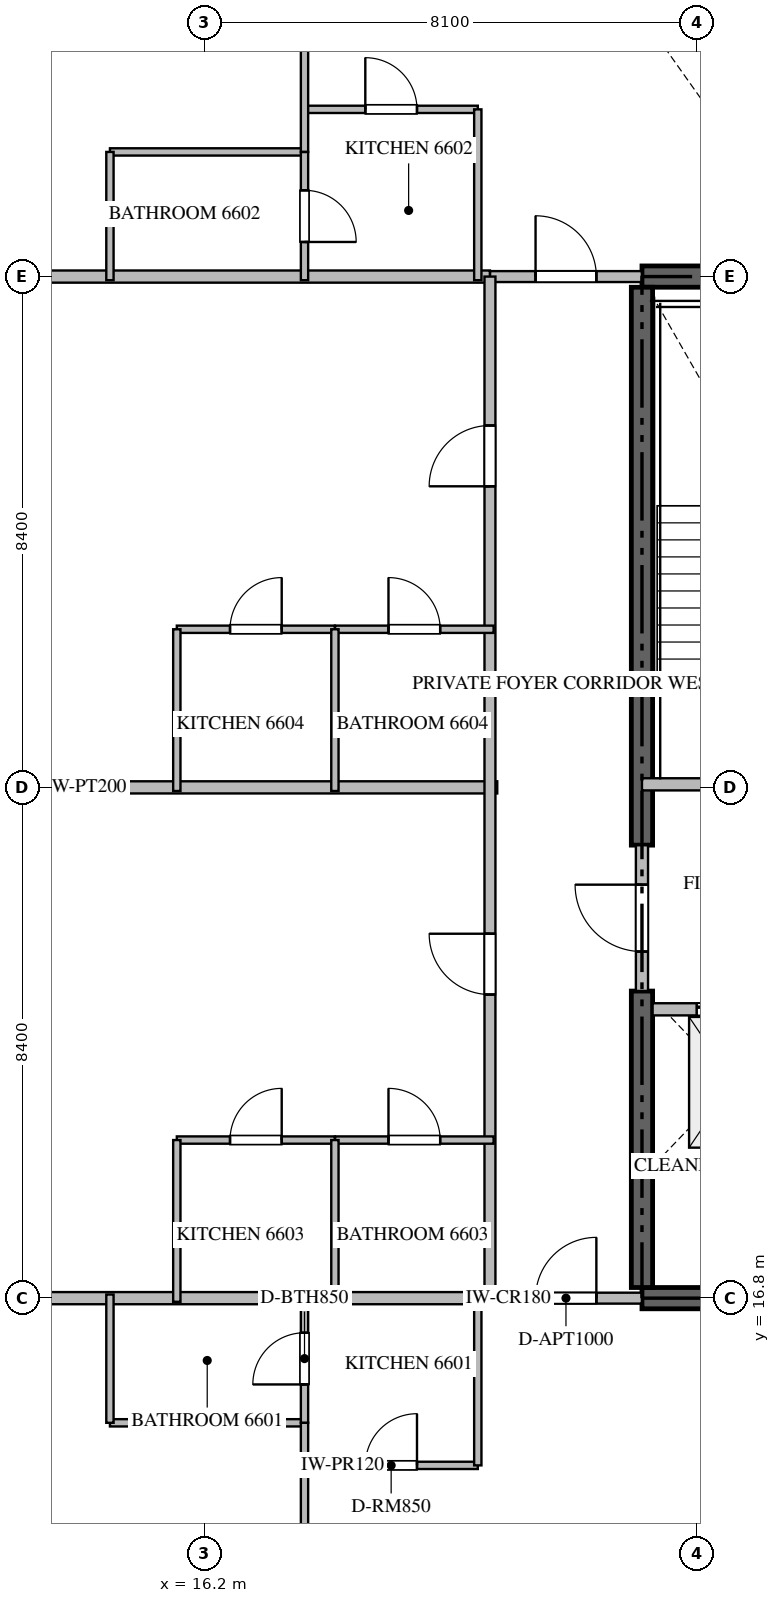
"""IFC4 building model, lengths in metres.
Left out: names, types, materials, properties, quantities, classifications, styles, units other than length and angle.
Written with IfcOpenShell. Run it as: python <this file> out.ifc"""

import sys

from ifc_helpers import new_model, si_unit, direction, frame, frame_2d, origin, place, context, subcontext, project, spatial, rectangle, extrude, source, transform, mapped, element, fill, save


model = new_model("IFC4")
c1 = context("Model", 3, precision=1e-05, world=origin(), true_north=direction((0.0, 1.0)))
c2 = subcontext(c1, "Body", "Model", "MODEL_VIEW")
j1 = project(units=[si_unit("LENGTHUNIT", "METRE"), si_unit("PLANEANGLEUNIT", "RADIAN")], contexts=[c1])
p1 = place(None, origin())
s1 = spatial("IfcSite", under=j1, at=p1, CompositionType="ELEMENT")
p2 = place(p1, origin())
s2 = spatial("IfcBuilding", under=s1, at=p2, CompositionType="ELEMENT")
p3 = place(p2, frame((0.0, 0.0, 264.35)))
s3 = spatial("IfcBuildingStorey", under=s2, at=p3, CompositionType="ELEMENT", Elevation=264.35)
for number, where, z_axis, x_axis in (
    (1, (23.4, 16.8, -0.26), (0.0, 0.0, 1.0), (1.0, 0.0, 0.0)),
    (2, (41.4, 33.6, -0.26), (0.0, 0.0, 1.0), (-1.0, 0.0, 0.0)),
):
    element("IfcWall", number, at=place(p3, frame(where, z_axis=z_axis, x_axis=x_axis)), inside=s3, PredefinedType="SHEAR", context=c2, shape_type="SweptSolid", body=[
        extrude(rectangle(XDim=18.0, YDim=0.35, at=frame_2d((9.0, 0.0))), origin(), (0.0, 0.0, 1.0), 3.848),
    ])
p4 = place(p3, frame((23.4, 16.975, -0.26), z_axis=(0.0, 0.0, 1.0), x_axis=(0.0, 1.0, 0.0)))
e3 = element("IfcWall", 3, at=p4, inside=s3, PredefinedType="SHEAR", context=c2, shape_type="SweptSolid", body=[
    extrude(rectangle(XDim=4.875, YDim=0.35, at=frame_2d((2.438, 0.0))), origin(), (0.0, 0.0, 1.0), 3.848),
])
p5 = place(p3, frame((23.4, 24.25, -0.26), z_axis=(0.0, 0.0, 1.0), x_axis=(0.0, 1.0, 0.0)))
e4 = element("IfcWall", 4, at=p5, inside=s3, PredefinedType="SHEAR", context=c2, shape_type="SweptSolid", body=[
    extrude(rectangle(XDim=9.175, YDim=0.35, at=frame_2d((4.587, 0.0))), origin(), (0.0, 0.0, 1.0), 3.848),
])
p6 = place(p3, frame((23.4, 25.25, 0.0), z_axis=(0.0, 0.0, 1.0), x_axis=(1.0, 0.0, 0.0)))
e5 = element("IfcWall", 5, at=p6, inside=s3, PredefinedType="STANDARD", context=c2, shape_type="SweptSolid", body=[
    extrude(rectangle(XDim=4.45, YDim=0.2, at=frame_2d((2.225, 0.0))), origin(), (0.0, 0.0, 1.0), 3.59),
])
p7 = place(p6, frame((1.65, 0.0, 0.0)))
e6 = element("IfcOpeningElement", 6, at=p7, cuts=e5, PredefinedType="OPENING", context=c2, shape_type="SweptSolid", body=[
    extrude(rectangle(XDim=1.1, YDim=2.15, at=frame_2d((0.55, 1.075))), frame((0.0, 0.11, 0.0), z_axis=(0.0, -1.0, 0.0), x_axis=(1.0, 0.0, 0.0)), (0.0, 0.0, 1.0), 0.22),
])
p8 = place(p3, frame((23.575, 21.55, 0.0), z_axis=(0.0, 0.0, 1.0), x_axis=(1.0, 0.0, 0.0)))
e7 = element("IfcWall", 7, at=p8, inside=s3, PredefinedType="STANDARD", context=c2, shape_type="SweptSolid", body=[
    extrude(rectangle(XDim=2.475, YDim=0.2, at=frame_2d((1.238, 0.0))), origin(), (0.0, 0.0, 1.0), 3.59),
])
p9 = place(p8, frame((0.725, 0.0, 0.0)))
e8 = element("IfcOpeningElement", 8, at=p9, cuts=e7, PredefinedType="OPENING", context=c2, shape_type="SweptSolid", body=[
    extrude(rectangle(XDim=1.2, YDim=2.2, at=frame_2d((0.6, 1.1))), frame((0.0, 0.11, 0.0), z_axis=(0.0, -1.0, 0.0), x_axis=(1.0, 0.0, 0.0)), (0.0, 0.0, 1.0), 0.22),
])
p10 = place(p3, frame((23.575, 19.05, 0.0), z_axis=(0.0, 0.0, 1.0), x_axis=(1.0, 0.0, 0.0)))
e9 = element("IfcWall", 9, at=p10, inside=s3, PredefinedType="STANDARD", context=c2, shape_type="SweptSolid", body=[
    extrude(rectangle(XDim=2.475, YDim=0.2, at=frame_2d((1.238, 0.0))), origin(), (0.0, 0.0, 1.0), 3.59),
])
p11 = place(p3, frame((23.4, 21.852, 0.0), z_axis=(0.0, 0.0, 1.0), x_axis=(0.0, 1.0, 0.0)))
e10 = element("IfcWall", 10, at=p11, inside=s3, PredefinedType="STANDARD", context=c2, shape_type="SweptSolid", body=[
    extrude(rectangle(XDim=2.396, YDim=0.2, at=frame_2d((1.198, 0.0))), origin(), (0.0, 0.0, 1.0), 3.59),
])
p12 = place(p11, frame((0.648, 0.0, 0.0)))
e11 = element("IfcOpeningElement", 11, at=p12, cuts=e10, PredefinedType="OPENING", context=c2, shape_type="SweptSolid", body=[
    extrude(rectangle(XDim=1.1, YDim=2.15, at=frame_2d((0.55, 1.075))), frame((0.0, 0.11, 0.0), z_axis=(0.0, -1.0, 0.0), x_axis=(1.0, 0.0, 0.0)), (0.0, 0.0, 1.0), 0.22),
])
p13 = place(p3, frame((7.482, 25.2, 0.0), z_axis=(0.0, 0.0, 1.0), x_axis=(1.0, 0.0, 0.0)))
e12 = element("IfcWall", 12, at=p13, inside=s3, PredefinedType="PARTITIONING", context=c2, shape_type="SweptSolid", body=[
    extrude(rectangle(XDim=13.538, YDim=0.2, at=frame_2d((6.769, 0.0))), origin(), (0.0, 0.0, 1.0), 3.59),
])
for number, where, z_axis, x_axis in (
    (13, (7.482, 16.8, 0.0), (0.0, 0.0, 1.0), (1.0, 0.0, 0.0)),
    (14, (7.482, 33.6, 0.0), (0.0, 0.0, 1.0), (1.0, 0.0, 0.0)),
):
    element("IfcWall", number, at=place(p3, frame(where, z_axis=z_axis, x_axis=x_axis)), inside=s3, PredefinedType="PARTITIONING", context=c2, shape_type="SweptSolid", body=[
        extrude(rectangle(XDim=13.418, YDim=0.2, at=frame_2d((6.709, 0.0))), origin(), (0.0, 0.0, 1.0), 3.59),
    ])
p14 = place(p3, frame((20.902, 16.8, 0.0), z_axis=(0.0, 0.0, 1.0), x_axis=(1.0, 0.0, 0.0)))
e15 = element("IfcWall", 15, at=p14, inside=s3, PredefinedType="PARTITIONING", context=c2, shape_type="SweptSolid", body=[
    extrude(rectangle(XDim=2.496, YDim=0.18, at=frame_2d((1.248, 0.0))), origin(), (0.0, 0.0, 1.0), 3.59),
])
p15 = place(p14, frame((0.748, 0.0, 0.0)))
e16 = element("IfcOpeningElement", 16, at=p15, cuts=e15, PredefinedType="OPENING", context=c2, shape_type="SweptSolid", body=[
    extrude(rectangle(XDim=1.0, YDim=2.15, at=frame_2d((0.5, 1.075))), frame((0.0, 0.1, 0.0), z_axis=(0.0, -1.0, 0.0), x_axis=(1.0, 0.0, 0.0)), (0.0, 0.0, 1.0), 0.2),
])
p16 = place(p3, frame((20.902, 33.6, 0.0), z_axis=(0.0, 0.0, 1.0), x_axis=(1.0, 0.0, 0.0)))
e17 = element("IfcWall", 17, at=p16, inside=s3, PredefinedType="PARTITIONING", context=c2, shape_type="SweptSolid", body=[
    extrude(rectangle(XDim=2.496, YDim=0.18, at=frame_2d((1.248, 0.0))), origin(), (0.0, 0.0, 1.0), 3.59),
])
p17 = place(p16, frame((0.748, 0.0, 0.0)))
e18 = element("IfcOpeningElement", 18, at=p17, cuts=e17, PredefinedType="OPENING", context=c2, shape_type="SweptSolid", body=[
    extrude(rectangle(XDim=1.0, YDim=2.15, at=frame_2d((0.5, 1.075))), frame((0.0, 0.1, 0.0), z_axis=(0.0, -1.0, 0.0), x_axis=(1.0, 0.0, 0.0)), (0.0, 0.0, 1.0), 0.2),
])
p18 = place(p3, frame((20.9, 16.8, 0.0), z_axis=(0.0, 0.0, 1.0), x_axis=(0.0, 1.0, 0.0)))
e19 = element("IfcWall", 19, at=p18, inside=s3, PredefinedType="PARTITIONING", context=c2, shape_type="SweptSolid", body=[
    extrude(rectangle(XDim=16.8, YDim=0.18, at=frame_2d((8.4, 0.0))), origin(), (0.0, 0.0, 1.0), 3.59),
])
p19 = place(p18, frame((4.993, 0.0, 0.0)))
e20 = element("IfcOpeningElement", 20, at=p19, cuts=e19, PredefinedType="OPENING", context=c2, shape_type="SweptSolid", body=[
    extrude(rectangle(XDim=1.0, YDim=2.15, at=frame_2d((0.5, 1.075))), frame((0.0, 0.1, 0.0), z_axis=(0.0, -1.0, 0.0), x_axis=(1.0, 0.0, 0.0)), (0.0, 0.0, 1.0), 0.2),
])
p20 = place(p18, frame((13.351, 0.0, 0.0)))
e21 = element("IfcOpeningElement", 21, at=p20, cuts=e19, PredefinedType="OPENING", context=c2, shape_type="SweptSolid", body=[
    extrude(rectangle(XDim=1.0, YDim=2.15, at=frame_2d((0.5, 1.075))), frame((0.0, 0.1, 0.0), z_axis=(0.0, -1.0, 0.0), x_axis=(1.0, 0.0, 0.0)), (0.0, 0.0, 1.0), 0.2),
])
p21 = place(p3, frame((17.85, 14.05, 0.0), z_axis=(0.0, 0.0, 1.0), x_axis=(1.0, 0.0, 0.0)))
e22 = element("IfcWall", 22, at=p21, inside=s3, PredefinedType="PARTITIONING", context=c2, shape_type="SweptSolid", body=[
    extrude(rectangle(XDim=2.85, YDim=0.12, at=frame_2d((1.425, 0.0))), origin(), (0.0, 0.0, 1.0), 3.59),
])
p22 = place(p21, frame((1.0, 0.0, 0.0)))
e23 = element("IfcOpeningElement", 23, at=p22, cuts=e22, PredefinedType="OPENING", context=c2, shape_type="SweptSolid", body=[
    extrude(rectangle(XDim=0.85, YDim=2.1, at=frame_2d((0.425, 1.05))), frame((0.0, 0.07, 0.0), z_axis=(0.0, -1.0, 0.0), x_axis=(1.0, 0.0, 0.0)), (0.0, 0.0, 1.0), 0.14),
])
p23 = place(p3, frame((20.7, 14.05, 0.0), z_axis=(0.0, 0.0, 1.0), x_axis=(0.0, 1.0, 0.0)))
e24 = element("IfcWall", 24, at=p23, inside=s3, PredefinedType="PARTITIONING", context=c2, shape_type="SweptSolid", body=[
    extrude(rectangle(XDim=2.81, YDim=0.12, at=frame_2d((1.405, 0.0))), origin(), (0.0, 0.0, 1.0), 3.59),
])
p24 = place(p3, frame((14.65, 14.75, 0.0), z_axis=(0.0, 0.0, 1.0), x_axis=(1.0, 0.0, 0.0)))
e25 = element("IfcWall", 25, at=p24, inside=s3, PredefinedType="PARTITIONING", context=c2, shape_type="SweptSolid", body=[
    extrude(rectangle(XDim=3.2, YDim=0.12, at=frame_2d((1.6, 0.0))), origin(), (0.0, 0.0, 1.0), 3.59),
])
p25 = place(p3, frame((14.65, 14.75, 0.0), z_axis=(0.0, 0.0, 1.0), x_axis=(0.0, 1.0, 0.0)))
e26 = element("IfcWall", 26, at=p25, inside=s3, PredefinedType="PARTITIONING", context=c2, shape_type="SweptSolid", body=[
    extrude(rectangle(XDim=2.11, YDim=0.12, at=frame_2d((1.055, 0.0))), origin(), (0.0, 0.0, 1.0), 3.59),
])
p26 = place(p3, frame((17.85, 10.096, 0.0), z_axis=(0.0, 0.0, 1.0), x_axis=(0.0, 1.0, 0.0)))
e27 = element("IfcWall", 27, at=p26, inside=s3, PredefinedType="PARTITIONING", context=c2, shape_type="SweptSolid", body=[
    extrude(rectangle(XDim=4.654, YDim=0.12, at=frame_2d((2.327, 0.0))), origin(), (0.0, 0.0, 1.0), 3.59),
])
p27 = place(p26, frame((1.902, 0.0, 0.0)))
e28 = element("IfcOpeningElement", 28, at=p27, cuts=e27, PredefinedType="OPENING", context=c2, shape_type="SweptSolid", body=[
    extrude(rectangle(XDim=0.85, YDim=2.1, at=frame_2d((0.425, 1.05))), frame((0.0, 0.07, 0.0), z_axis=(0.0, -1.0, 0.0), x_axis=(1.0, 0.0, 0.0)), (0.0, 0.0, 1.0), 0.14),
])
p28 = place(p3, frame((17.85, 14.752, 0.0), z_axis=(0.0, 0.0, 1.0), x_axis=(0.0, 1.0, 0.0)))
e29 = element("IfcWall", 29, at=p28, inside=s3, PredefinedType="PARTITIONING", context=c2, shape_type="SweptSolid", body=[
    extrude(rectangle(XDim=2.108, YDim=0.12, at=frame_2d((1.054, 0.0))), origin(), (0.0, 0.0, 1.0), 3.59),
])
p29 = place(p28, frame((0.629, 0.0, 0.0)))
e30 = element("IfcOpeningElement", 30, at=p29, cuts=e29, PredefinedType="OPENING", context=c2, shape_type="SweptSolid", body=[
    extrude(rectangle(XDim=0.85, YDim=2.1, at=frame_2d((0.425, 1.05))), frame((0.0, 0.07, 0.0), z_axis=(0.0, -1.0, 0.0), x_axis=(1.0, 0.0, 0.0)), (0.0, 0.0, 1.0), 0.14),
])
p30 = place(p3, frame((17.85, 36.35, 0.0), z_axis=(0.0, 0.0, 1.0), x_axis=(1.0, 0.0, 0.0)))
e31 = element("IfcWall", 31, at=p30, inside=s3, PredefinedType="PARTITIONING", context=c2, shape_type="SweptSolid", body=[
    extrude(rectangle(XDim=2.85, YDim=0.12, at=frame_2d((1.425, 0.0))), origin(), (0.0, 0.0, 1.0), 3.59),
])
p31 = place(p30, frame((1.0, 0.0, 0.0)))
e32 = element("IfcOpeningElement", 32, at=p31, cuts=e31, PredefinedType="OPENING", context=c2, shape_type="SweptSolid", body=[
    extrude(rectangle(XDim=0.85, YDim=2.1, at=frame_2d((0.425, 1.05))), frame((0.0, 0.07, 0.0), z_axis=(0.0, -1.0, 0.0), x_axis=(1.0, 0.0, 0.0)), (0.0, 0.0, 1.0), 0.14),
])
p32 = place(p3, frame((20.7, 36.35, 0.0), z_axis=(0.0, 0.0, 1.0), x_axis=(0.0, -1.0, 0.0)))
e33 = element("IfcWall", 33, at=p32, inside=s3, PredefinedType="PARTITIONING", context=c2, shape_type="SweptSolid", body=[
    extrude(rectangle(XDim=2.81, YDim=0.12, at=frame_2d((1.405, 0.0))), origin(), (0.0, 0.0, 1.0), 3.59),
])
p33 = place(p3, frame((14.65, 35.65, 0.0), z_axis=(0.0, 0.0, 1.0), x_axis=(1.0, 0.0, 0.0)))
e34 = element("IfcWall", 34, at=p33, inside=s3, PredefinedType="PARTITIONING", context=c2, shape_type="SweptSolid", body=[
    extrude(rectangle(XDim=3.2, YDim=0.12, at=frame_2d((1.6, 0.0))), origin(), (0.0, 0.0, 1.0), 3.59),
])
p34 = place(p3, frame((14.65, 35.65, 0.0), z_axis=(0.0, 0.0, 1.0), x_axis=(0.0, -1.0, 0.0)))
e35 = element("IfcWall", 35, at=p34, inside=s3, PredefinedType="PARTITIONING", context=c2, shape_type="SweptSolid", body=[
    extrude(rectangle(XDim=2.11, YDim=0.12, at=frame_2d((1.055, 0.0))), origin(), (0.0, 0.0, 1.0), 3.59),
])
p35 = place(p3, frame((17.85, 40.304, 0.0), z_axis=(0.0, 0.0, 1.0), x_axis=(0.0, -1.0, 0.0)))
e36 = element("IfcWall", 36, at=p35, inside=s3, PredefinedType="PARTITIONING", context=c2, shape_type="SweptSolid", body=[
    extrude(rectangle(XDim=4.654, YDim=0.12, at=frame_2d((2.327, 0.0))), origin(), (0.0, 0.0, 1.0), 3.59),
])
p36 = place(p35, frame((1.902, 0.0, 0.0)))
e37 = element("IfcOpeningElement", 37, at=p36, cuts=e36, PredefinedType="OPENING", context=c2, shape_type="SweptSolid", body=[
    extrude(rectangle(XDim=0.85, YDim=2.1, at=frame_2d((0.425, 1.05))), frame((0.0, 0.07, 0.0), z_axis=(0.0, -1.0, 0.0), x_axis=(1.0, 0.0, 0.0)), (0.0, 0.0, 1.0), 0.14),
])
p37 = place(p3, frame((17.85, 35.648, 0.0), z_axis=(0.0, 0.0, 1.0), x_axis=(0.0, -1.0, 0.0)))
e38 = element("IfcWall", 38, at=p37, inside=s3, PredefinedType="PARTITIONING", context=c2, shape_type="SweptSolid", body=[
    extrude(rectangle(XDim=2.108, YDim=0.12, at=frame_2d((1.054, 0.0))), origin(), (0.0, 0.0, 1.0), 3.59),
])
p38 = place(p37, frame((0.629, 0.0, 0.0)))
e39 = element("IfcOpeningElement", 39, at=p38, cuts=e38, PredefinedType="OPENING", context=c2, shape_type="SweptSolid", body=[
    extrude(rectangle(XDim=0.85, YDim=2.1, at=frame_2d((0.425, 1.05))), frame((0.0, 0.07, 0.0), z_axis=(0.0, -1.0, 0.0), x_axis=(1.0, 0.0, 0.0)), (0.0, 0.0, 1.0), 0.14),
])
p39 = place(p3, frame((15.75, 19.4, 0.0), z_axis=(0.0, 0.0, 1.0), x_axis=(1.0, 0.0, 0.0)))
e40 = element("IfcWall", 40, at=p39, inside=s3, PredefinedType="PARTITIONING", context=c2, shape_type="SweptSolid", body=[
    extrude(rectangle(XDim=2.6, YDim=0.12, at=frame_2d((1.3, 0.0))), origin(), (0.0, 0.0, 1.0), 3.59),
])
p40 = place(p39, frame((0.875, 0.0, 0.0)))
e41 = element("IfcOpeningElement", 41, at=p40, cuts=e40, PredefinedType="OPENING", context=c2, shape_type="SweptSolid", body=[
    extrude(rectangle(XDim=0.85, YDim=2.1, at=frame_2d((0.425, 1.05))), frame((0.0, 0.07, 0.0), z_axis=(0.0, -1.0, 0.0), x_axis=(1.0, 0.0, 0.0)), (0.0, 0.0, 1.0), 0.14),
])
p41 = place(p3, frame((18.352, 19.4, 0.0), z_axis=(0.0, 0.0, 1.0), x_axis=(1.0, 0.0, 0.0)))
e42 = element("IfcWall", 42, at=p41, inside=s3, PredefinedType="PARTITIONING", context=c2, shape_type="SweptSolid", body=[
    extrude(rectangle(XDim=2.608, YDim=0.12, at=frame_2d((1.304, 0.0))), origin(), (0.0, 0.0, 1.0), 3.59),
])
p42 = place(p41, frame((0.879, 0.0, 0.0)))
e43 = element("IfcOpeningElement", 43, at=p42, cuts=e42, PredefinedType="OPENING", context=c2, shape_type="SweptSolid", body=[
    extrude(rectangle(XDim=0.85, YDim=2.1, at=frame_2d((0.425, 1.05))), frame((0.0, 0.07, 0.0), z_axis=(0.0, -1.0, 0.0), x_axis=(1.0, 0.0, 0.0)), (0.0, 0.0, 1.0), 0.14),
])
for number, where, z_axis, x_axis in (
    (44, (18.35, 16.74, 0.0), (0.0, 0.0, 1.0), (0.0, 1.0, 0.0)),
    (45, (15.75, 16.74, 0.0), (0.0, 0.0, 1.0), (0.0, 1.0, 0.0)),
):
    element("IfcWall", number, at=place(p3, frame(where, z_axis=z_axis, x_axis=x_axis)), inside=s3, PredefinedType="PARTITIONING", context=c2, shape_type="SweptSolid", body=[
        extrude(rectangle(XDim=2.66, YDim=0.12, at=frame_2d((1.33, 0.0))), origin(), (0.0, 0.0, 1.0), 3.59),
    ])
p43 = place(p3, frame((15.75, 27.8, 0.0), z_axis=(0.0, 0.0, 1.0), x_axis=(1.0, 0.0, 0.0)))
e46 = element("IfcWall", 46, at=p43, inside=s3, PredefinedType="PARTITIONING", context=c2, shape_type="SweptSolid", body=[
    extrude(rectangle(XDim=2.6, YDim=0.12, at=frame_2d((1.3, 0.0))), origin(), (0.0, 0.0, 1.0), 3.59),
])
p44 = place(p43, frame((0.875, 0.0, 0.0)))
e47 = element("IfcOpeningElement", 47, at=p44, cuts=e46, PredefinedType="OPENING", context=c2, shape_type="SweptSolid", body=[
    extrude(rectangle(XDim=0.85, YDim=2.1, at=frame_2d((0.425, 1.05))), frame((0.0, 0.07, 0.0), z_axis=(0.0, -1.0, 0.0), x_axis=(1.0, 0.0, 0.0)), (0.0, 0.0, 1.0), 0.14),
])
p45 = place(p3, frame((18.352, 27.8, 0.0), z_axis=(0.0, 0.0, 1.0), x_axis=(1.0, 0.0, 0.0)))
e48 = element("IfcWall", 48, at=p45, inside=s3, PredefinedType="PARTITIONING", context=c2, shape_type="SweptSolid", body=[
    extrude(rectangle(XDim=2.608, YDim=0.12, at=frame_2d((1.304, 0.0))), origin(), (0.0, 0.0, 1.0), 3.59),
])
p46 = place(p45, frame((0.879, 0.0, 0.0)))
e49 = element("IfcOpeningElement", 49, at=p46, cuts=e48, PredefinedType="OPENING", context=c2, shape_type="SweptSolid", body=[
    extrude(rectangle(XDim=0.85, YDim=2.1, at=frame_2d((0.425, 1.05))), frame((0.0, 0.07, 0.0), z_axis=(0.0, -1.0, 0.0), x_axis=(1.0, 0.0, 0.0)), (0.0, 0.0, 1.0), 0.14),
])
for number, where, z_axis, x_axis in (
    (50, (18.35, 25.14, 0.0), (0.0, 0.0, 1.0), (0.0, 1.0, 0.0)),
    (51, (15.75, 25.14, 0.0), (0.0, 0.0, 1.0), (0.0, 1.0, 0.0)),
):
    element("IfcWall", number, at=place(p3, frame(where, z_axis=z_axis, x_axis=x_axis)), inside=s3, PredefinedType="PARTITIONING", context=c2, shape_type="SweptSolid", body=[
        extrude(rectangle(XDim=2.66, YDim=0.12, at=frame_2d((1.33, 0.0))), origin(), (0.0, 0.0, 1.0), 3.59),
    ])
m1 = source(origin(), c2, "Body", "SweptSolid", [
    extrude(rectangle(XDim=1.2, YDim=2.2, at=frame_2d((0.6, 1.1))), frame((0.0, 0.025, 0.0), z_axis=(0.0, -1.0, 0.0), x_axis=(1.0, 0.0, 0.0)), (0.0, 0.0, 1.0), 0.05),
])
p47 = place(p9, origin())
e52 = element("IfcDoor", 52, at=p47, inside=s3, OperationType="DOUBLE_DOOR_SLIDING", PredefinedType="DOOR", context=c2, shape_type="MappedRepresentation", body=[
    mapped(m1, transform((0.0, 0.0, 0.0), scale=1.0)),
])
fill(e8, e52)
m2 = source(origin(), c2, "Body", "SweptSolid", [
    extrude(rectangle(XDim=1.1, YDim=2.15, at=frame_2d((0.55, 1.075))), frame((0.0, 0.025, 0.0), z_axis=(0.0, -1.0, 0.0), x_axis=(1.0, 0.0, 0.0)), (0.0, 0.0, 1.0), 0.05),
])
p48 = place(p12, origin())
e53 = element("IfcDoor", 53, at=p48, inside=s3, OperationType="SINGLE_SWING_RIGHT", PredefinedType="DOOR", context=c2, shape_type="MappedRepresentation", body=[
    mapped(m2, transform((0.0, 0.0, 0.0), scale=1.0)),
])
fill(e11, e53)
m3 = source(origin(), c2, "Body", "SweptSolid", [
    extrude(rectangle(XDim=1.0, YDim=2.15, at=frame_2d((0.5, 1.075))), frame((0.0, 0.025, 0.0), z_axis=(0.0, -1.0, 0.0), x_axis=(1.0, 0.0, 0.0)), (0.0, 0.0, 1.0), 0.05),
])
p49 = place(p15, origin())
e54 = element("IfcDoor", 54, at=p49, inside=s3, OperationType="SINGLE_SWING_RIGHT", PredefinedType="DOOR", context=c2, shape_type="MappedRepresentation", body=[
    mapped(m3, transform((0.0, 0.0, 0.0), scale=1.0)),
])
fill(e16, e54)
p50 = place(p17, origin())
e55 = element("IfcDoor", 55, at=p50, inside=s3, OperationType="SINGLE_SWING_LEFT", PredefinedType="DOOR", context=c2, shape_type="MappedRepresentation", body=[
    mapped(m3, transform((0.0, 0.0, 0.0), scale=1.0)),
])
fill(e18, e55)
p51 = place(p19, origin())
e56 = element("IfcDoor", 56, at=p51, inside=s3, OperationType="SINGLE_SWING_RIGHT", PredefinedType="DOOR", context=c2, shape_type="MappedRepresentation", body=[
    mapped(m3, transform((0.0, 0.0, 0.0), scale=1.0)),
])
fill(e20, e56)
p52 = place(p20, origin())
e57 = element("IfcDoor", 57, at=p52, inside=s3, OperationType="SINGLE_SWING_LEFT", PredefinedType="DOOR", context=c2, shape_type="MappedRepresentation", body=[
    mapped(m3, transform((0.0, 0.0, 0.0), scale=1.0)),
])
fill(e21, e57)
m4 = source(origin(), c2, "Body", "SweptSolid", [
    extrude(rectangle(XDim=0.85, YDim=2.1, at=frame_2d((0.425, 1.05))), frame((0.0, 0.025, 0.0), z_axis=(0.0, -1.0, 0.0), x_axis=(1.0, 0.0, 0.0)), (0.0, 0.0, 1.0), 0.05),
])
p53 = place(p22, origin())
e58 = element("IfcDoor", 58, at=p53, inside=s3, OperationType="SINGLE_SWING_RIGHT", PredefinedType="DOOR", context=c2, shape_type="MappedRepresentation", body=[
    mapped(m4, transform((0.0, 0.0, 0.0), scale=1.0)),
])
fill(e23, e58)
p54 = place(p29, origin())
e59 = element("IfcDoor", 59, at=p54, inside=s3, OperationType="SINGLE_SWING_LEFT", PredefinedType="DOOR", context=c2, shape_type="MappedRepresentation", body=[
    mapped(m4, transform((0.0, 0.0, 0.0), scale=1.0)),
])
fill(e30, e59)
p55 = place(p31, origin())
e60 = element("IfcDoor", 60, at=p55, inside=s3, OperationType="SINGLE_SWING_LEFT", PredefinedType="DOOR", context=c2, shape_type="MappedRepresentation", body=[
    mapped(m4, transform((0.0, 0.0, 0.0), scale=1.0)),
])
fill(e32, e60)
p56 = place(p38, origin())
e61 = element("IfcDoor", 61, at=p56, inside=s3, OperationType="SINGLE_SWING_RIGHT", PredefinedType="DOOR", context=c2, shape_type="MappedRepresentation", body=[
    mapped(m4, transform((0.0, 0.0, 0.0), scale=1.0)),
])
fill(e39, e61)
p57 = place(p40, origin())
e62 = element("IfcDoor", 62, at=p57, inside=s3, OperationType="SINGLE_SWING_RIGHT", PredefinedType="DOOR", context=c2, shape_type="MappedRepresentation", body=[
    mapped(m4, transform((0.0, 0.0, 0.0), scale=1.0)),
])
fill(e41, e62)
p58 = place(p42, origin())
e63 = element("IfcDoor", 63, at=p58, inside=s3, OperationType="SINGLE_SWING_LEFT", PredefinedType="DOOR", context=c2, shape_type="MappedRepresentation", body=[
    mapped(m4, transform((0.0, 0.0, 0.0), scale=1.0)),
])
fill(e43, e63)
p59 = place(p44, origin())
e64 = element("IfcDoor", 64, at=p59, inside=s3, OperationType="SINGLE_SWING_RIGHT", PredefinedType="DOOR", context=c2, shape_type="MappedRepresentation", body=[
    mapped(m4, transform((0.0, 0.0, 0.0), scale=1.0)),
])
fill(e47, e64)
p60 = place(p46, origin())
e65 = element("IfcDoor", 65, at=p60, inside=s3, OperationType="SINGLE_SWING_LEFT", PredefinedType="DOOR", context=c2, shape_type="MappedRepresentation", body=[
    mapped(m4, transform((0.0, 0.0, 0.0), scale=1.0)),
])
fill(e49, e65)
save(model, sys.argv[1])
